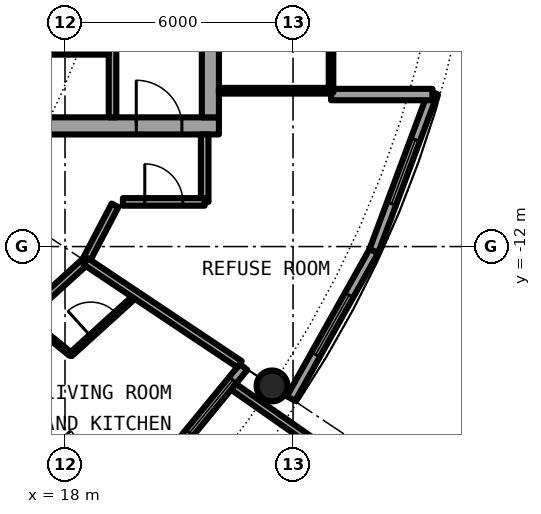
"""IFC4 building model, lengths in metres.
Left out: names, types, materials, properties, quantities, classifications, styles, units other than length and angle.
Written with IfcOpenShell. Run it as: python <this file> out.ifc"""

import sys

from ifc_helpers import new_model, si_unit, direction, frame, frame_2d, origin, origin_2d, place, context, subcontext, project, spatial, rectangle, hollow_circle, extrude, element, fill, save


model = new_model("IFC4")
c1 = context("Model", 3, precision=1e-05, world=origin(), true_north=direction((0.0, 1.0)))
c2 = subcontext(c1, "Body", "Model", "MODEL_VIEW")
j1 = project(units=[si_unit("LENGTHUNIT", "METRE"), si_unit("PLANEANGLEUNIT", "RADIAN")], contexts=[c1])
p1 = place(None, origin())
s1 = spatial("IfcSite", under=j1, at=p1, CompositionType="ELEMENT")
p2 = place(p1, origin())
s2 = spatial("IfcBuilding", under=s1, at=p2, CompositionType="ELEMENT")
p3 = place(p2, frame((0.0, 0.0, 190.2)))
s3 = spatial("IfcBuildingStorey", under=s2, at=p3, CompositionType="ELEMENT", Elevation=190.2)
p4 = place(p3, frame((23.448, -15.667, 0.0), z_axis=(0.0, 0.0, 1.0), x_axis=(1.0, 0.0, 0.0)))
e1 = element("IfcColumn", 1, at=p4, inside=s3, PredefinedType="COLUMN", context=c2, shape_type="SweptSolid", body=[
    extrude(hollow_circle(Radius=0.406, WallThickness=0.03, at=origin_2d()), origin(), (0.0, 0.0, 1.0), 3.05),
])
p5 = place(p3, frame((19.304, -19.304, 0.0), z_axis=(0.0, 0.0, 1.0), x_axis=(0.634382322723, 0.773019449054, 0.0)))
e2 = element("IfcWall", 2, at=p5, inside=s3, PredefinedType="SOLIDWALL", context=c2, shape_type="SweptSolid", body=[
    extrude(rectangle(XDim=5.352, YDim=0.25, at=frame_2d((2.676, 0.0))), origin(), (0.0, 0.0, 1.0), 2.7),
])
p6 = place(p5, frame((0.841, 0.0, 0.0)))
e3 = element("IfcOpeningElement", 3, at=p6, cuts=e2, PredefinedType="OPENING", context=c2, shape_type="SweptSolid", body=[
    extrude(rectangle(XDim=1.0, YDim=2.2, at=frame_2d((0.5, 1.1))), frame((0.0, 0.135, 0.0), z_axis=(0.0, -1.0, 0.0), x_axis=(1.0, 0.0, 0.0)), (0.0, 0.0, 1.0), 0.27),
])
p7 = place(p5, frame((3.111, 0.0, 0.3)))
e4 = element("IfcOpeningElement", 4, at=p7, cuts=e2, PredefinedType="OPENING", context=c2, shape_type="SweptSolid", body=[
    extrude(rectangle(XDim=1.8, YDim=2.1, at=frame_2d((0.9, 1.05))), frame((0.0, 0.135, 0.0), z_axis=(0.0, -1.0, 0.0), x_axis=(1.0, 0.0, 0.0)), (0.0, 0.0, 1.0), 0.27),
])
p8 = place(p3, frame((22.433, -15.688, -0.03), z_axis=(0.0, 0.0, 1.0), x_axis=(0.819373043115, -0.573260687834, 0.0)))
e5 = element("IfcWall", 5, at=p8, inside=s3, PredefinedType="SOLIDWALL", context=c2, shape_type="SweptSolid", body=[
    extrude(rectangle(XDim=2.925, YDim=0.2, at=frame_2d((1.463, 0.0))), origin(), (0.0, 0.0, 1.0), 2.73),
])
p9 = place(p3, frame((23.946, -16.0, 0.0), z_axis=(0.0, 0.0, 1.0), x_axis=(0.489696356642, 0.871893042919, 0.0)))
e6 = element("IfcWall", 6, at=p9, inside=s3, PredefinedType="SOLIDWALL", context=c2, shape_type="SweptSolid", body=[
    extrude(rectangle(XDim=4.454, YDim=0.25, at=frame_2d((2.227, 0.0))), origin(), (0.0, 0.0, 1.0), 2.7),
])
p10 = place(p9, frame((1.327, 0.0, 0.3)))
e7 = element("IfcOpeningElement", 7, at=p10, cuts=e6, PredefinedType="OPENING", context=c2, shape_type="SweptSolid", body=[
    extrude(rectangle(XDim=1.8, YDim=2.1, at=frame_2d((0.9, 1.05))), frame((0.0, 0.135, 0.0), z_axis=(0.0, -1.0, 0.0), x_axis=(1.0, 0.0, 0.0)), (0.0, 0.0, 1.0), 0.27),
])
p11 = place(p3, frame((26.127, -12.117, 0.0), z_axis=(0.0, 0.0, 1.0), x_axis=(0.349247811493, 0.937030397675, 0.0)))
e8 = element("IfcWall", 8, at=p11, inside=s3, PredefinedType="SOLIDWALL", context=c2, shape_type="SweptSolid", body=[
    extrude(rectangle(XDim=4.452, YDim=0.25, at=frame_2d((2.226, 0.0))), origin(), (0.0, 0.0, 1.0), 2.7),
])
p12 = place(p11, frame((1.327, 0.0, 0.3)))
e9 = element("IfcOpeningElement", 9, at=p12, cuts=e8, PredefinedType="OPENING", context=c2, shape_type="SweptSolid", body=[
    extrude(rectangle(XDim=1.8, YDim=2.1, at=frame_2d((0.9, 1.05))), frame((0.0, 0.135, 0.0), z_axis=(0.0, -1.0, 0.0), x_axis=(1.0, 0.0, 0.0)), (0.0, 0.0, 1.0), 0.27),
])
p13 = place(p3, frame((25.0, -8.0, 0.0), z_axis=(0.0, 0.0, 1.0), x_axis=(1.0, 0.0, 0.0)))
e10 = element("IfcWall", 10, at=p13, inside=s3, PredefinedType="SOLIDWALL", context=c2, shape_type="SweptSolid", body=[
    extrude(rectangle(XDim=2.667, YDim=0.3, at=frame_2d((1.333, 0.0))), origin(), (0.0, 0.0, 1.0), 2.7),
])
p14 = place(p3, frame((8.55, -8.825, 0.0), z_axis=(0.0, 0.0, 1.0), x_axis=(1.0, 0.0, 0.0)))
e11 = element("IfcWall", 11, at=p14, inside=s3, PredefinedType="SHEAR", context=c2, shape_type="SweptSolid", body=[
    extrude(rectangle(XDim=13.5, YDim=0.45, at=frame_2d((6.75, 0.0))), origin(), (0.0, 0.0, 1.0), 3.05),
])
p15 = place(p14, frame((11.325, 0.0, 0.0)))
e12 = element("IfcOpeningElement", 12, at=p15, cuts=e11, PredefinedType="OPENING", context=c2, shape_type="SweptSolid", body=[
    extrude(rectangle(XDim=1.2, YDim=2.3, at=frame_2d((0.6, 1.15))), frame((0.0, 0.235, 0.0), z_axis=(0.0, -1.0, 0.0), x_axis=(1.0, 0.0, 0.0)), (0.0, 0.0, 1.0), 0.47),
])
p16 = place(p3, frame((21.825, 8.6, 0.0), z_axis=(0.0, 0.0, 1.0), x_axis=(0.0, -1.0, 0.0)))
e13 = element("IfcWall", 13, at=p16, inside=s3, PredefinedType="SHEAR", context=c2, shape_type="SweptSolid", body=[
    extrude(rectangle(XDim=17.2, YDim=0.45, at=frame_2d((8.6, 0.0))), origin(), (0.0, 0.0, 1.0), 3.05),
])
p17 = place(p16, frame((7.7, 0.0, 0.0)))
e14 = element("IfcOpeningElement", 14, at=p17, cuts=e13, PredefinedType="OPENING", context=c2, shape_type="SweptSolid", body=[
    extrude(rectangle(XDim=1.8, YDim=2.3, at=frame_2d((0.9, 1.15))), frame((0.0, 0.235, 0.0), z_axis=(0.0, -1.0, 0.0), x_axis=(1.0, 0.0, 0.0)), (0.0, 0.0, 1.0), 0.47),
])
p18 = place(p3, frame((19.25, -8.6, 0.0), z_axis=(0.0, 0.0, 1.0), x_axis=(0.0, 1.0, 0.0)))
e15 = element("IfcWall", 15, at=p18, inside=s3, PredefinedType="SOLIDWALL", context=c2, shape_type="SweptSolid", body=[
    extrude(rectangle(XDim=7.025, YDim=0.2, at=frame_2d((3.513, 0.0))), origin(), (0.0, 0.0, 1.0), 2.7),
])
p19 = place(p18, frame((2.35, 0.0, 0.0)))
e16 = element("IfcOpeningElement", 16, at=p19, cuts=e15, PredefinedType="OPENING", context=c2, shape_type="SweptSolid", body=[
    extrude(rectangle(XDim=1.1, YDim=2.3, at=frame_2d((0.55, 1.15))), frame((0.0, 0.11, 0.0), z_axis=(0.0, -1.0, 0.0), x_axis=(1.0, 0.0, 0.0)), (0.0, 0.0, 1.0), 0.22),
])
p20 = place(p3, frame((15.45, -6.875, 0.0), z_axis=(0.0, 0.0, 1.0), x_axis=(1.0, 0.0, 0.0)))
e17 = element("IfcWall", 17, at=p20, inside=s3, PredefinedType="PARTITIONING", context=c2, shape_type="SweptSolid", body=[
    extrude(rectangle(XDim=3.7, YDim=0.15, at=frame_2d((1.85, 0.0))), origin(), (0.0, 0.0, 1.0), 2.7),
])
p21 = place(p20, frame((1.4, 0.0, 0.0)))
e18 = element("IfcOpeningElement", 18, at=p21, cuts=e17, PredefinedType="OPENING", context=c2, shape_type="SweptSolid", body=[
    extrude(rectangle(XDim=0.9, YDim=2.3, at=frame_2d((0.45, 1.15))), frame((0.0, 0.085, 0.0), z_axis=(0.0, -1.0, 0.0), x_axis=(1.0, 0.0, 0.0)), (0.0, 0.0, 1.0), 0.17),
])
p22 = place(p3, frame((22.05, -7.9, 0.0), z_axis=(0.0, 0.0, 1.0), x_axis=(1.0, 0.0, 0.0)))
e19 = element("IfcWall", 19, at=p22, inside=s3, PredefinedType="PARTITIONING", context=c2, shape_type="SweptSolid", body=[
    extrude(rectangle(XDim=2.89, YDim=0.15, at=frame_2d((1.445, 0.0))), origin(), (0.0, 0.0, 1.0), 2.7),
])
p23 = place(p3, frame((25.0, -7.95, 0.0), z_axis=(0.0, 0.0, 1.0), x_axis=(0.0, 1.0, 0.0)))
e20 = element("IfcWall", 20, at=p23, inside=s3, PredefinedType="PARTITIONING", context=c2, shape_type="SweptSolid", body=[
    extrude(rectangle(XDim=15.9, YDim=0.12, at=frame_2d((7.95, 0.0))), origin(), (0.0, 0.0, 1.0), 2.7),
])
p24 = place(p23, frame((0.95, 0.0, 0.1)))
e21 = element("IfcOpeningElement", 21, at=p24, cuts=e20, PredefinedType="OPENING", context=c2, shape_type="SweptSolid", body=[
    extrude(rectangle(XDim=14.0, YDim=2.35, at=frame_2d((7.0, 1.175))), frame((0.0, 0.07, 0.0), z_axis=(0.0, -1.0, 0.0), x_axis=(1.0, 0.0, 0.0)), (0.0, 0.0, 1.0), 0.14),
])
p25 = place(p3, frame((18.147, -14.844, 0.0), z_axis=(0.0, 0.0, 1.0), x_axis=(0.741080073381, 0.671416655169, 0.0)))
e22 = element("IfcWall", 22, at=p25, inside=s3, PredefinedType="PARTITIONING", context=c2, shape_type="SweptSolid", body=[
    extrude(rectangle(XDim=2.323, YDim=0.1, at=frame_2d((1.162, 0.0))), origin(), (0.0, 0.0, 1.0), 2.7),
])
p26 = place(p25, frame((0.718, 0.0, 0.0)))
e23 = element("IfcOpeningElement", 23, at=p26, cuts=e22, PredefinedType="OPENING", context=c2, shape_type="SweptSolid", body=[
    extrude(rectangle(XDim=0.9, YDim=2.3, at=frame_2d((0.45, 1.15))), frame((0.0, 0.06, 0.0), z_axis=(0.0, -1.0, 0.0), x_axis=(1.0, 0.0, 0.0)), (0.0, 0.0, 1.0), 0.12),
])
p27 = place(p3, frame((18.542, -12.389, 0.0), z_axis=(0.0, 0.0, 1.0), x_axis=(0.465359652486, 0.885121683068, 0.0)))
e24 = element("IfcWall", 24, at=p27, inside=s3, PredefinedType="PARTITIONING", context=c2, shape_type="SweptSolid", body=[
    extrude(rectangle(XDim=1.665, YDim=0.2, at=frame_2d((0.833, 0.0))), origin(), (0.0, 0.0, 1.0), 2.7),
])
p28 = place(p3, frame((21.675, -10.825, 0.0), z_axis=(0.0, 0.0, 1.0), x_axis=(0.0, 1.0, 0.0)))
e25 = element("IfcWall", 25, at=p28, inside=s3, PredefinedType="PARTITIONING", context=c2, shape_type="SweptSolid", body=[
    extrude(rectangle(XDim=1.775, YDim=0.2, at=frame_2d((0.887, 0.0))), origin(), (0.0, 0.0, 1.0), 2.7),
])
p29 = place(p3, frame((10.51, -19.669, 0.0), z_axis=(0.0, 0.0, 1.0), x_axis=(0.74093897184, 0.671572363941, 0.0)))
e26 = element("IfcWall", 26, at=p29, inside=s3, PredefinedType="PARTITIONING", context=c2, shape_type="SweptSolid", body=[
    extrude(rectangle(XDim=10.84, YDim=0.2, at=frame_2d((5.42, 0.0))), origin(), (0.0, 0.0, 1.0), 2.7),
])
p30 = place(p29, frame((4.922, 0.0, 0.0)))
e27 = element("IfcOpeningElement", 27, at=p30, cuts=e26, PredefinedType="OPENING", context=c2, shape_type="SweptSolid", body=[
    extrude(rectangle(XDim=1.0, YDim=2.3, at=frame_2d((0.5, 1.15))), frame((0.0, 0.11, 0.0), z_axis=(0.0, -1.0, 0.0), x_axis=(1.0, 0.0, 0.0)), (0.0, 0.0, 1.0), 0.22),
])
p31 = place(p3, frame((19.523, -10.825, 0.0), z_axis=(0.0, 0.0, 1.0), x_axis=(1.0, 0.0, 0.0)))
e28 = element("IfcWall", 28, at=p31, inside=s3, PredefinedType="PARTITIONING", context=c2, shape_type="SweptSolid", body=[
    extrude(rectangle(XDim=2.152, YDim=0.2, at=frame_2d((1.076, 0.0))), origin(), (0.0, 0.0, 1.0), 2.7),
])
p32 = place(p31, frame((0.576, 0.0, 0.0)))
e29 = element("IfcOpeningElement", 29, at=p32, cuts=e28, PredefinedType="OPENING", context=c2, shape_type="SweptSolid", body=[
    extrude(rectangle(XDim=1.0, YDim=2.3, at=frame_2d((0.5, 1.15))), frame((0.0, 0.11, 0.0), z_axis=(0.0, -1.0, 0.0), x_axis=(1.0, 0.0, 0.0)), (0.0, 0.0, 1.0), 0.22),
])
p33 = place(p3, frame((16.427, -16.401, 0.0), z_axis=(0.0, 0.0, 1.0), x_axis=(0.707722727509, -0.706490297858, 0.0)))
e30 = element("IfcWall", 30, at=p33, inside=s3, PredefinedType="PARTITIONING", context=c2, shape_type="SweptSolid", body=[
    extrude(rectangle(XDim=3.962, YDim=0.1, at=frame_2d((1.981, 0.0))), origin(), (0.0, 0.0, 1.0), 2.7),
])
p34 = place(p33, frame((1.531, 0.0, 0.0)))
e31 = element("IfcOpeningElement", 31, at=p34, cuts=e30, PredefinedType="OPENING", context=c2, shape_type="SweptSolid", body=[
    extrude(rectangle(XDim=0.9, YDim=2.3, at=frame_2d((0.45, 1.15))), frame((0.0, 0.06, 0.0), z_axis=(0.0, -1.0, 0.0), x_axis=(1.0, 0.0, 0.0)), (0.0, 0.0, 1.0), 0.12),
])
p35 = place(p3, frame((16.936, -13.845, 0.0), z_axis=(0.0, 0.0, 1.0), x_axis=(0.774283039722, -0.632839453889, 0.0)))
e32 = element("IfcWall", 32, at=p35, inside=s3, PredefinedType="PARTITIONING", context=c2, shape_type="SweptSolid", body=[
    extrude(rectangle(XDim=1.569, YDim=0.1, at=frame_2d((0.785, 0.0))), origin(), (0.0, 0.0, 1.0), 2.7),
])
p36 = place(p3, frame((18.542, -12.389, 0.0), z_axis=(0.0, 0.0, 1.0), x_axis=(0.831387096605, -0.55569370664, 0.0)))
e33 = element("IfcWall", 33, at=p36, inside=s3, PredefinedType="PARTITIONING", context=c2, shape_type="SweptSolid", body=[
    extrude(rectangle(XDim=4.875, YDim=0.2, at=frame_2d((2.438, 0.0))), origin(), (0.0, 0.0, 1.0), 2.7),
])
p37 = place(p7, origin())
e34 = element("IfcWindow", 34, at=p37, inside=s3, PartitioningType="SINGLE_PANEL", PredefinedType="WINDOW", context=c2, shape_type="SweptSolid", body=[
    extrude(rectangle(XDim=1.8, YDim=2.1, at=frame_2d((0.9, 1.05))), frame((0.0, 0.03, 0.0), z_axis=(0.0, -1.0, 0.0), x_axis=(1.0, 0.0, 0.0)), (0.0, 0.0, 1.0), 0.06),
])
fill(e4, e34)
p38 = place(p10, origin())
e35 = element("IfcWindow", 35, at=p38, inside=s3, PartitioningType="SINGLE_PANEL", PredefinedType="WINDOW", context=c2, shape_type="SweptSolid", body=[
    extrude(rectangle(XDim=1.8, YDim=2.1, at=frame_2d((0.9, 1.05))), frame((0.0, 0.03, 0.0), z_axis=(0.0, -1.0, 0.0), x_axis=(1.0, 0.0, 0.0)), (0.0, 0.0, 1.0), 0.06),
])
fill(e7, e35)
p39 = place(p12, origin())
e36 = element("IfcWindow", 36, at=p39, inside=s3, PartitioningType="SINGLE_PANEL", PredefinedType="WINDOW", context=c2, shape_type="SweptSolid", body=[
    extrude(rectangle(XDim=1.8, YDim=2.1, at=frame_2d((0.9, 1.05))), frame((0.0, 0.03, 0.0), z_axis=(0.0, -1.0, 0.0), x_axis=(1.0, 0.0, 0.0)), (0.0, 0.0, 1.0), 0.06),
])
fill(e9, e36)
p40 = place(p21, origin())
e37 = element("IfcDoor", 37, at=p40, inside=s3, OperationType="SINGLE_SWING_LEFT", PredefinedType="DOOR", context=c2, shape_type="SweptSolid", body=[
    extrude(rectangle(XDim=0.9, YDim=2.3, at=frame_2d((0.45, 1.15))), frame((0.0, 0.025, 0.0), z_axis=(0.0, -1.0, 0.0), x_axis=(1.0, 0.0, 0.0)), (0.0, 0.0, 1.0), 0.05),
])
fill(e18, e37)
p41 = place(p15, origin())
e38 = element("IfcDoor", 38, at=p41, inside=s3, OperationType="SINGLE_SWING_LEFT", PredefinedType="DOOR", context=c2, shape_type="SweptSolid", body=[
    extrude(rectangle(XDim=1.2, YDim=2.3, at=frame_2d((0.6, 1.15))), frame((0.0, 0.025, 0.0), z_axis=(0.0, -1.0, 0.0), x_axis=(1.0, 0.0, 0.0)), (0.0, 0.0, 1.0), 0.05),
])
fill(e12, e38)
p42 = place(p24, origin())
e39 = element("IfcWindow", 39, at=p42, inside=s3, PartitioningType="SINGLE_PANEL", PredefinedType="WINDOW", context=c2, shape_type="SweptSolid", body=[
    extrude(rectangle(XDim=14.0, YDim=2.35, at=frame_2d((7.0, 1.175))), frame((0.0, 0.03, 0.0), z_axis=(0.0, -1.0, 0.0), x_axis=(1.0, 0.0, 0.0)), (0.0, 0.0, 1.0), 0.06),
])
fill(e21, e39)
p43 = place(p26, origin())
e40 = element("IfcDoor", 40, at=p43, inside=s3, OperationType="SINGLE_SWING_RIGHT", PredefinedType="DOOR", context=c2, shape_type="SweptSolid", body=[
    extrude(rectangle(XDim=0.9, YDim=2.3, at=frame_2d((0.45, 1.15))), frame((0.0, 0.025, 0.0), z_axis=(0.0, -1.0, 0.0), x_axis=(1.0, 0.0, 0.0)), (0.0, 0.0, 1.0), 0.05),
])
fill(e23, e40)
p44 = place(p32, origin())
e41 = element("IfcDoor", 41, at=p44, inside=s3, OperationType="SINGLE_SWING_LEFT", PredefinedType="DOOR", context=c2, shape_type="SweptSolid", body=[
    extrude(rectangle(XDim=1.0, YDim=2.3, at=frame_2d((0.5, 1.15))), frame((0.0, 0.025, 0.0), z_axis=(0.0, -1.0, 0.0), x_axis=(1.0, 0.0, 0.0)), (0.0, 0.0, 1.0), 0.05),
])
fill(e29, e41)
save(model, sys.argv[1])
